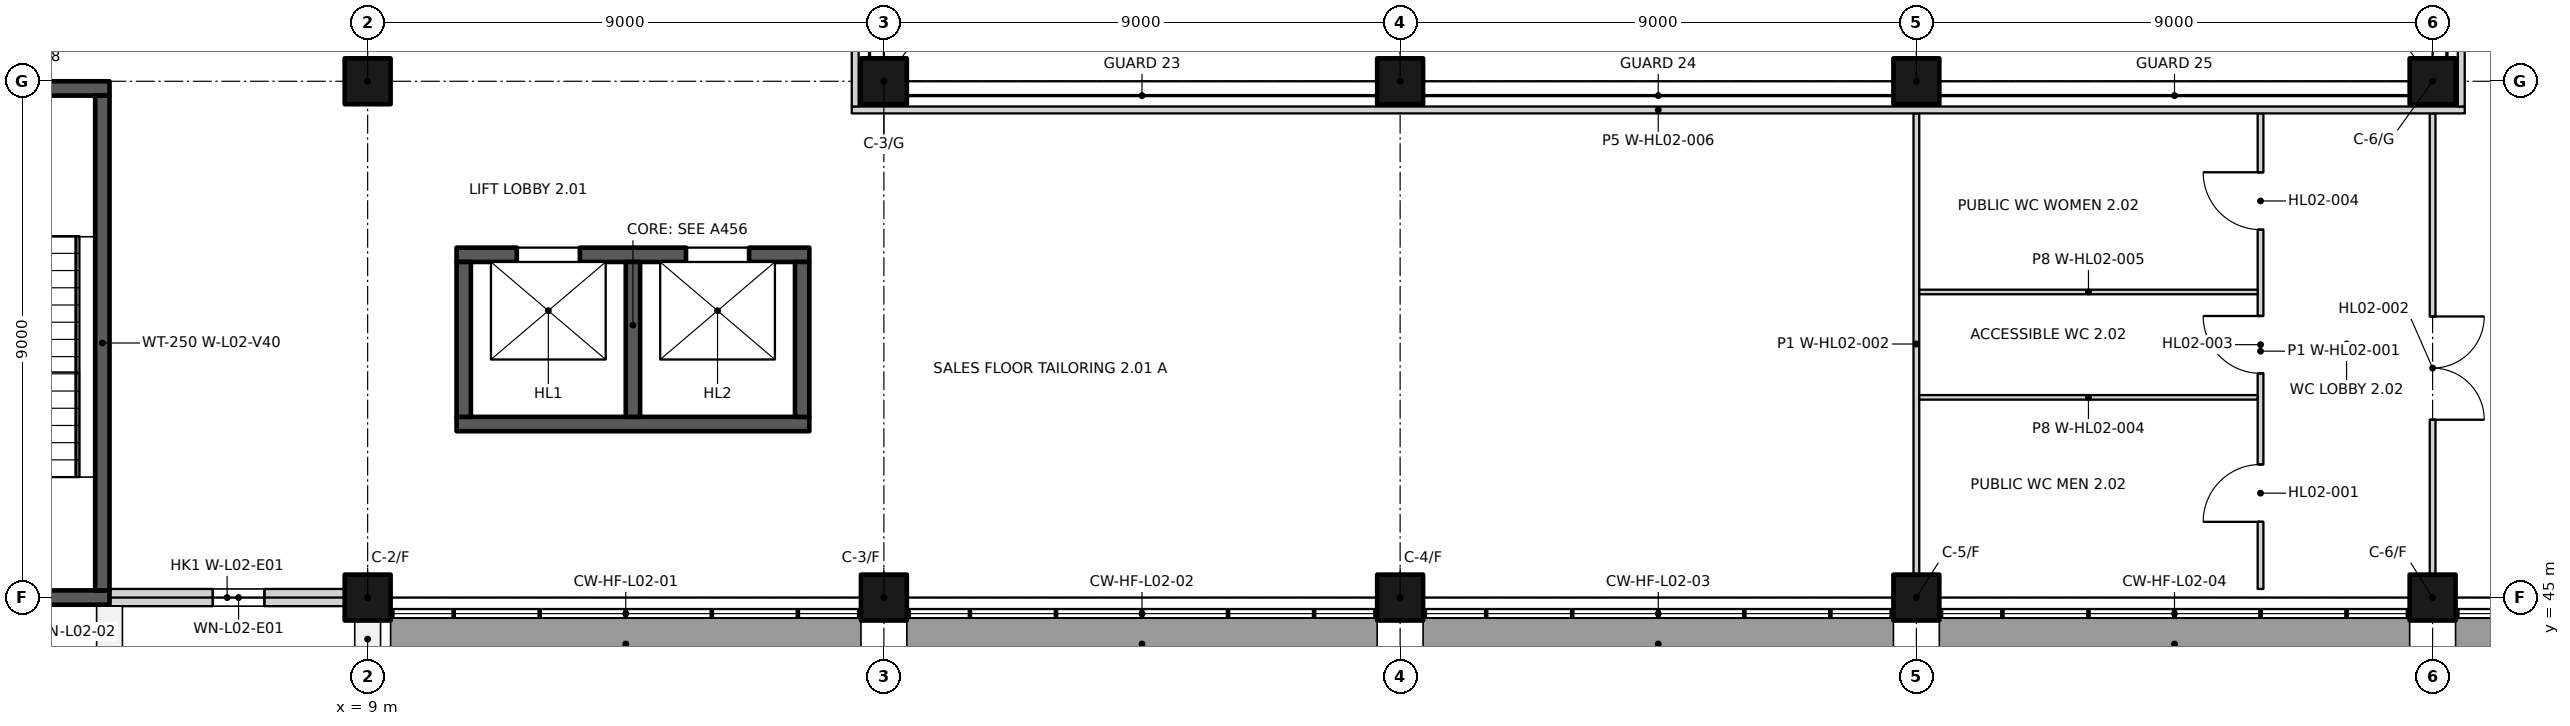
"""IFC4 building model, lengths in metres.
Left out: names, types, materials, properties, quantities, classifications, styles, units other than length and angle.
Written with IfcOpenShell. Run it as: python <this file> out.ifc"""

import sys

from ifc_helpers import new_model, si_unit, direction, frame, frame_2d, origin, origin_2d, place, context, subcontext, project, spatial, rectangle, extrude, element, fill, save


model = new_model("IFC4")
c1 = context("Model", 3, precision=1e-05, world=origin(), true_north=direction((0.0, 1.0)))
c2 = subcontext(c1, "Body", "Model", "MODEL_VIEW")
j1 = project(units=[si_unit("LENGTHUNIT", "METRE"), si_unit("PLANEANGLEUNIT", "RADIAN")], contexts=[c1])
p1 = place(None, origin())
s1 = spatial("IfcSite", under=j1, at=p1, CompositionType="ELEMENT")
p2 = place(p1, origin())
s2 = spatial("IfcBuilding", under=s1, at=p2, CompositionType="ELEMENT")
p3 = place(p2, frame((0.0, 0.0, 10.5)))
s3 = spatial("IfcBuildingStorey", under=s2, at=p3, CompositionType="ELEMENT", Elevation=10.5)
for number, where, z_axis, x_axis in (
    (1, (9.0, 45.0, 0.0), (0.0, 0.0, 1.0), (1.0, 0.0, 0.0)),
    (2, (18.0, 45.0, 0.0), (0.0, 0.0, 1.0), (1.0, 0.0, 0.0)),
    (3, (27.0, 45.0, 0.0), (0.0, 0.0, 1.0), (1.0, 0.0, 0.0)),
    (4, (36.0, 45.0, 0.0), (0.0, 0.0, 1.0), (1.0, 0.0, 0.0)),
    (5, (45.0, 45.0, 0.0), (0.0, 0.0, 1.0), (1.0, 0.0, 0.0)),
    (6, (9.0, 54.0, 0.0), (0.0, 0.0, 1.0), (1.0, 0.0, 0.0)),
    (7, (18.0, 54.0, 0.0), (0.0, 0.0, 1.0), (1.0, 0.0, 0.0)),
    (8, (27.0, 54.0, 0.0), (0.0, 0.0, 1.0), (1.0, 0.0, 0.0)),
    (9, (36.0, 54.0, 0.0), (0.0, 0.0, 1.0), (1.0, 0.0, 0.0)),
    (10, (45.0, 54.0, 0.0), (0.0, 0.0, 1.0), (1.0, 0.0, 0.0)),
):
    element("IfcColumn", number, at=place(p3, frame(where, z_axis=z_axis, x_axis=x_axis)), inside=s3, PredefinedType="COLUMN", context=c2, shape_type="SweptSolid", body=[
        extrude(rectangle(XDim=0.8, YDim=0.8, at=origin_2d()), origin(), (0.0, 0.0, 1.0), 4.5),
    ])
p4 = place(p3, frame((2.188, 45.0, 0.0), z_axis=(0.0, 0.0, 1.0), x_axis=(1.0, 0.0, 0.0)))
e11 = element("IfcWall", 11, at=p4, inside=s3, PredefinedType="SHEAR", context=c2, shape_type="SweptSolid", body=[
    extrude(rectangle(XDim=2.312, YDim=0.25, at=frame_2d((1.156, 0.0))), origin(), (0.0, 0.0, 1.0), 4.5),
])
p5 = place(p3, frame((0.4, 53.875, 0.0), z_axis=(0.0, 0.0, 1.0), x_axis=(1.0, 0.0, 0.0)))
e12 = element("IfcWall", 12, at=p5, inside=s3, PredefinedType="SHEAR", context=c2, shape_type="SweptSolid", body=[
    extrude(rectangle(XDim=4.1, YDim=0.25, at=frame_2d((2.05, 0.0))), origin(), (0.0, 0.0, 1.0), 4.5),
])
p6 = place(p5, frame((2.75, 0.0, 0.0), z_axis=(0.0, 0.0, 1.0), x_axis=(-1.0, 0.0, 0.0)))
e13 = element("IfcOpeningElement", 13, at=p6, cuts=e12, PredefinedType="OPENING", context=c2, shape_type="SweptSolid", body=[
    extrude(rectangle(XDim=1.8, YDim=2.1, at=frame_2d((0.9, 1.05))), frame((0.0, 0.135, 0.0), z_axis=(0.0, -1.0, 0.0), x_axis=(1.0, 0.0, 0.0)), (0.0, 0.0, 1.0), 0.27),
])
p7 = place(p3, frame((4.375, 45.125, 0.0), z_axis=(0.0, 0.0, 1.0), x_axis=(0.0, 1.0, 0.0)))
e14 = element("IfcWall", 14, at=p7, inside=s3, PredefinedType="SHEAR", context=c2, shape_type="SweptSolid", body=[
    extrude(rectangle(XDim=8.625, YDim=0.25, at=frame_2d((4.312, 0.0))), origin(), (0.0, 0.0, 1.0), 4.5),
])
p8 = place(p3, frame((10.55, 50.975, 0.0), z_axis=(0.0, 0.0, 1.0), x_axis=(1.0, 0.0, 0.0)))
e15 = element("IfcWall", 15, at=p8, inside=s3, PredefinedType="SHEAR", context=c2, shape_type="SweptSolid", body=[
    extrude(rectangle(XDim=6.15, YDim=0.25, at=frame_2d((3.075, 0.0))), origin(), (0.0, 0.0, 1.0), 4.5),
])
p9 = place(p8, frame((1.05, 0.0, 0.0)))
e16 = element("IfcOpeningElement", 16, at=p9, cuts=e15, PredefinedType="OPENING", context=c2, shape_type="SweptSolid", body=[
    extrude(rectangle(XDim=1.1, YDim=2.1, at=frame_2d((0.55, 1.05))), frame((0.0, 0.135, 0.0), z_axis=(0.0, -1.0, 0.0), x_axis=(1.0, 0.0, 0.0)), (0.0, 0.0, 1.0), 0.27),
])
p10 = place(p8, frame((4.0, 0.0, 0.0)))
e17 = element("IfcOpeningElement", 17, at=p10, cuts=e15, PredefinedType="OPENING", context=c2, shape_type="SweptSolid", body=[
    extrude(rectangle(XDim=1.1, YDim=2.1, at=frame_2d((0.55, 1.05))), frame((0.0, 0.135, 0.0), z_axis=(0.0, -1.0, 0.0), x_axis=(1.0, 0.0, 0.0)), (0.0, 0.0, 1.0), 0.27),
])
p11 = place(p3, frame((10.55, 48.025, 0.0), z_axis=(0.0, 0.0, 1.0), x_axis=(1.0, 0.0, 0.0)))
e18 = element("IfcWall", 18, at=p11, inside=s3, PredefinedType="SHEAR", context=c2, shape_type="SweptSolid", body=[
    extrude(rectangle(XDim=6.15, YDim=0.25, at=frame_2d((3.075, 0.0))), origin(), (0.0, 0.0, 1.0), 4.5),
])
for number, where, z_axis, x_axis in (
    (19, (10.675, 48.15, 0.0), (0.0, 0.0, 1.0), (0.0, 1.0, 0.0)),
    (20, (13.625, 48.15, 0.0), (0.0, 0.0, 1.0), (0.0, 1.0, 0.0)),
    (21, (16.575, 48.15, 0.0), (0.0, 0.0, 1.0), (0.0, 1.0, 0.0)),
):
    element("IfcWall", number, at=place(p3, frame(where, z_axis=z_axis, x_axis=x_axis)), inside=s3, PredefinedType="SHEAR", context=c2, shape_type="SweptSolid", body=[
        extrude(rectangle(XDim=2.7, YDim=0.25, at=frame_2d((1.35, 0.0))), origin(), (0.0, 0.0, 1.0), 4.5),
    ])
p12 = place(p3, frame((8.6, 45.0, 0.0), z_axis=(0.0, 0.0, 1.0), x_axis=(-1.0, 0.0, 0.0)))
e22 = element("IfcWall", 22, at=p12, inside=s3, PredefinedType="SOLIDWALL", context=c2, shape_type="SweptSolid", body=[
    extrude(rectangle(XDim=4.1, YDim=0.3, at=frame_2d((2.05, 0.0))), origin(), (0.0, 0.0, 1.0), 3.7),
])
p13 = place(p12, frame((1.4, 0.0, 0.45)))
e23 = element("IfcOpeningElement", 23, at=p13, cuts=e22, PredefinedType="OPENING", context=c2, shape_type="SweptSolid", body=[
    extrude(rectangle(XDim=0.9, YDim=3.0, at=frame_2d((0.45, 1.5))), frame((0.0, 0.16, 0.0), z_axis=(0.0, -1.0, 0.0), x_axis=(1.0, 0.0, 0.0)), (0.0, 0.0, 1.0), 0.32),
])
p14 = place(p3, frame((42.0, 45.15, 0.0), z_axis=(0.0, 0.0, 1.0), x_axis=(0.0, 1.0, 0.0)))
e24 = element("IfcWall", 24, at=p14, inside=s3, PredefinedType="PARTITIONING", context=c2, shape_type="SweptSolid", body=[
    extrude(rectangle(XDim=8.29, YDim=0.1, at=frame_2d((4.145, 0.0))), origin(), (0.0, 0.0, 1.0), 3.7),
])
p15 = place(p14, frame((1.17, 0.0, 0.0)))
e25 = element("IfcOpeningElement", 25, at=p15, cuts=e24, PredefinedType="OPENING", context=c2, shape_type="SweptSolid", body=[
    extrude(rectangle(XDim=1.0, YDim=2.1, at=frame_2d((0.5, 1.05))), frame((0.0, 0.06, 0.0), z_axis=(0.0, -1.0, 0.0), x_axis=(1.0, 0.0, 0.0)), (0.0, 0.0, 1.0), 0.12),
])
p16 = place(p14, frame((3.759, 0.0, 0.0)))
e26 = element("IfcOpeningElement", 26, at=p16, cuts=e24, PredefinedType="OPENING", context=c2, shape_type="SweptSolid", body=[
    extrude(rectangle(XDim=1.0, YDim=2.1, at=frame_2d((0.5, 1.05))), frame((0.0, 0.06, 0.0), z_axis=(0.0, -1.0, 0.0), x_axis=(1.0, 0.0, 0.0)), (0.0, 0.0, 1.0), 0.12),
])
p17 = place(p14, frame((6.263, 0.0, 0.0)))
e27 = element("IfcOpeningElement", 27, at=p17, cuts=e24, PredefinedType="OPENING", context=c2, shape_type="SweptSolid", body=[
    extrude(rectangle(XDim=1.0, YDim=2.1, at=frame_2d((0.5, 1.05))), frame((0.0, 0.06, 0.0), z_axis=(0.0, -1.0, 0.0), x_axis=(1.0, 0.0, 0.0)), (0.0, 0.0, 1.0), 0.12),
])
p18 = place(p3, frame((36.0, 45.4, 0.0), z_axis=(0.0, 0.0, 1.0), x_axis=(0.0, 1.0, 0.0)))
e28 = element("IfcWall", 28, at=p18, inside=s3, PredefinedType="PARTITIONING", context=c2, shape_type="SweptSolid", body=[
    extrude(rectangle(XDim=8.04, YDim=0.1, at=frame_2d((4.02, 0.0))), origin(), (0.0, 0.0, 1.0), 4.2),
])
p19 = place(p3, frame((45.0, 45.4, 0.0), z_axis=(0.0, 0.0, 1.0), x_axis=(0.0, 1.0, 0.0)))
e29 = element("IfcWall", 29, at=p19, inside=s3, PredefinedType="PARTITIONING", context=c2, shape_type="SweptSolid", body=[
    extrude(rectangle(XDim=8.04, YDim=0.1, at=frame_2d((4.02, 0.0))), origin(), (0.0, 0.0, 1.0), 3.7),
])
p20 = place(p19, frame((4.5, 0.0, 0.0), z_axis=(0.0, 0.0, 1.0), x_axis=(-1.0, 0.0, 0.0)))
e30 = element("IfcOpeningElement", 30, at=p20, cuts=e29, PredefinedType="OPENING", context=c2, shape_type="SweptSolid", body=[
    extrude(rectangle(XDim=1.8, YDim=2.1, at=frame_2d((0.9, 1.05))), frame((0.0, 0.06, 0.0), z_axis=(0.0, -1.0, 0.0), x_axis=(1.0, 0.0, 0.0)), (0.0, 0.0, 1.0), 0.12),
])
for number, where, z_axis, x_axis in (
    (31, (36.05, 48.49, 0.0), (0.0, 0.0, 1.0), (1.0, 0.0, 0.0)),
    (32, (36.05, 50.327, 0.0), (0.0, 0.0, 1.0), (1.0, 0.0, 0.0)),
):
    element("IfcWall", number, at=place(p3, frame(where, z_axis=z_axis, x_axis=x_axis)), inside=s3, PredefinedType="PARTITIONING", context=c2, shape_type="SweptSolid", body=[
        extrude(rectangle(XDim=5.9, YDim=0.08, at=frame_2d((2.95, 0.0))), origin(), (0.0, 0.0, 1.0), 4.2),
    ])
p21 = place(p3, frame((17.44, 53.5, 0.0), z_axis=(0.0, 0.0, 1.0), x_axis=(1.0, 0.0, 0.0)))
e33 = element("IfcWall", 33, at=p21, inside=s3, PredefinedType="PARTITIONING", context=c2, shape_type="SweptSolid", body=[
    extrude(rectangle(XDim=28.12, YDim=0.12, at=frame_2d((14.06, 0.0))), origin(), (0.0, 0.0, 1.0), 3.7),
])
for number, where, z_axis, x_axis in (
    (34, (17.5, 53.56, 0.0), (0.0, 0.0, 1.0), (0.0, 1.0, 0.0)),
    (35, (45.5, 53.56, 0.0), (0.0, 0.0, 1.0), (0.0, 1.0, 0.0)),
):
    element("IfcWall", number, at=place(p3, frame(where, z_axis=z_axis, x_axis=x_axis)), inside=s3, PredefinedType="PARTITIONING", context=c2, shape_type="SweptSolid", body=[
        extrude(rectangle(XDim=36.565, YDim=0.12, at=frame_2d((18.282, 0.0))), origin(), (0.0, 0.0, 1.0), 3.7),
    ])
p22 = place(p9, origin())
e36 = element("IfcDoor", 36, at=p22, inside=s3, OperationType="DOUBLE_DOOR_SLIDING", PredefinedType="DOOR", context=c2, shape_type="SweptSolid", body=[
    extrude(rectangle(XDim=1.1, YDim=2.1, at=frame_2d((0.55, 1.05))), frame((0.0, 0.025, 0.0), z_axis=(0.0, -1.0, 0.0), x_axis=(1.0, 0.0, 0.0)), (0.0, 0.0, 1.0), 0.05),
])
fill(e16, e36)
p23 = place(p10, origin())
e37 = element("IfcDoor", 37, at=p23, inside=s3, OperationType="DOUBLE_DOOR_SLIDING", PredefinedType="DOOR", context=c2, shape_type="SweptSolid", body=[
    extrude(rectangle(XDim=1.1, YDim=2.1, at=frame_2d((0.55, 1.05))), frame((0.0, 0.025, 0.0), z_axis=(0.0, -1.0, 0.0), x_axis=(1.0, 0.0, 0.0)), (0.0, 0.0, 1.0), 0.05),
])
fill(e17, e37)
p24 = place(p13, origin())
e38 = element("IfcWindow", 38, at=p24, inside=s3, PartitioningType="SINGLE_PANEL", PredefinedType="WINDOW", context=c2, shape_type="SweptSolid", body=[
    extrude(rectangle(XDim=0.9, YDim=3.0, at=frame_2d((0.45, 1.5))), frame((0.0, -0.03, 0.0), z_axis=(0.0, -1.0, 0.0), x_axis=(1.0, 0.0, 0.0)), (0.0, 0.0, 1.0), 0.06),
])
fill(e23, e38)
p25 = place(p15, origin())
e39 = element("IfcDoor", 39, at=p25, inside=s3, OperationType="SINGLE_SWING_LEFT", PredefinedType="DOOR", context=c2, shape_type="SweptSolid", body=[
    extrude(rectangle(XDim=1.0, YDim=2.1, at=frame_2d((0.5, 1.05))), frame((0.0, 0.025, 0.0), z_axis=(0.0, -1.0, 0.0), x_axis=(1.0, 0.0, 0.0)), (0.0, 0.0, 1.0), 0.05),
])
fill(e25, e39)
p26 = place(p20, origin())
e40 = element("IfcDoor", 40, at=p26, inside=s3, OperationType="DOUBLE_DOOR_SINGLE_SWING", PredefinedType="DOOR", context=c2, shape_type="SweptSolid", body=[
    extrude(rectangle(XDim=1.8, YDim=2.1, at=frame_2d((0.9, 1.05))), frame((0.0, 0.025, 0.0), z_axis=(0.0, -1.0, 0.0), x_axis=(1.0, 0.0, 0.0)), (0.0, 0.0, 1.0), 0.05),
])
fill(e30, e40)
p27 = place(p16, origin())
e41 = element("IfcDoor", 41, at=p27, inside=s3, OperationType="SINGLE_SWING_RIGHT", PredefinedType="DOOR", context=c2, shape_type="SweptSolid", body=[
    extrude(rectangle(XDim=1.0, YDim=2.1, at=frame_2d((0.5, 1.05))), frame((0.0, 0.025, 0.0), z_axis=(0.0, -1.0, 0.0), x_axis=(1.0, 0.0, 0.0)), (0.0, 0.0, 1.0), 0.05),
])
fill(e26, e41)
p28 = place(p17, origin())
e42 = element("IfcDoor", 42, at=p28, inside=s3, OperationType="SINGLE_SWING_RIGHT", PredefinedType="DOOR", context=c2, shape_type="SweptSolid", body=[
    extrude(rectangle(XDim=1.0, YDim=2.1, at=frame_2d((0.5, 1.05))), frame((0.0, 0.025, 0.0), z_axis=(0.0, -1.0, 0.0), x_axis=(1.0, 0.0, 0.0)), (0.0, 0.0, 1.0), 0.05),
])
fill(e27, e42)
save(model, sys.argv[1])
